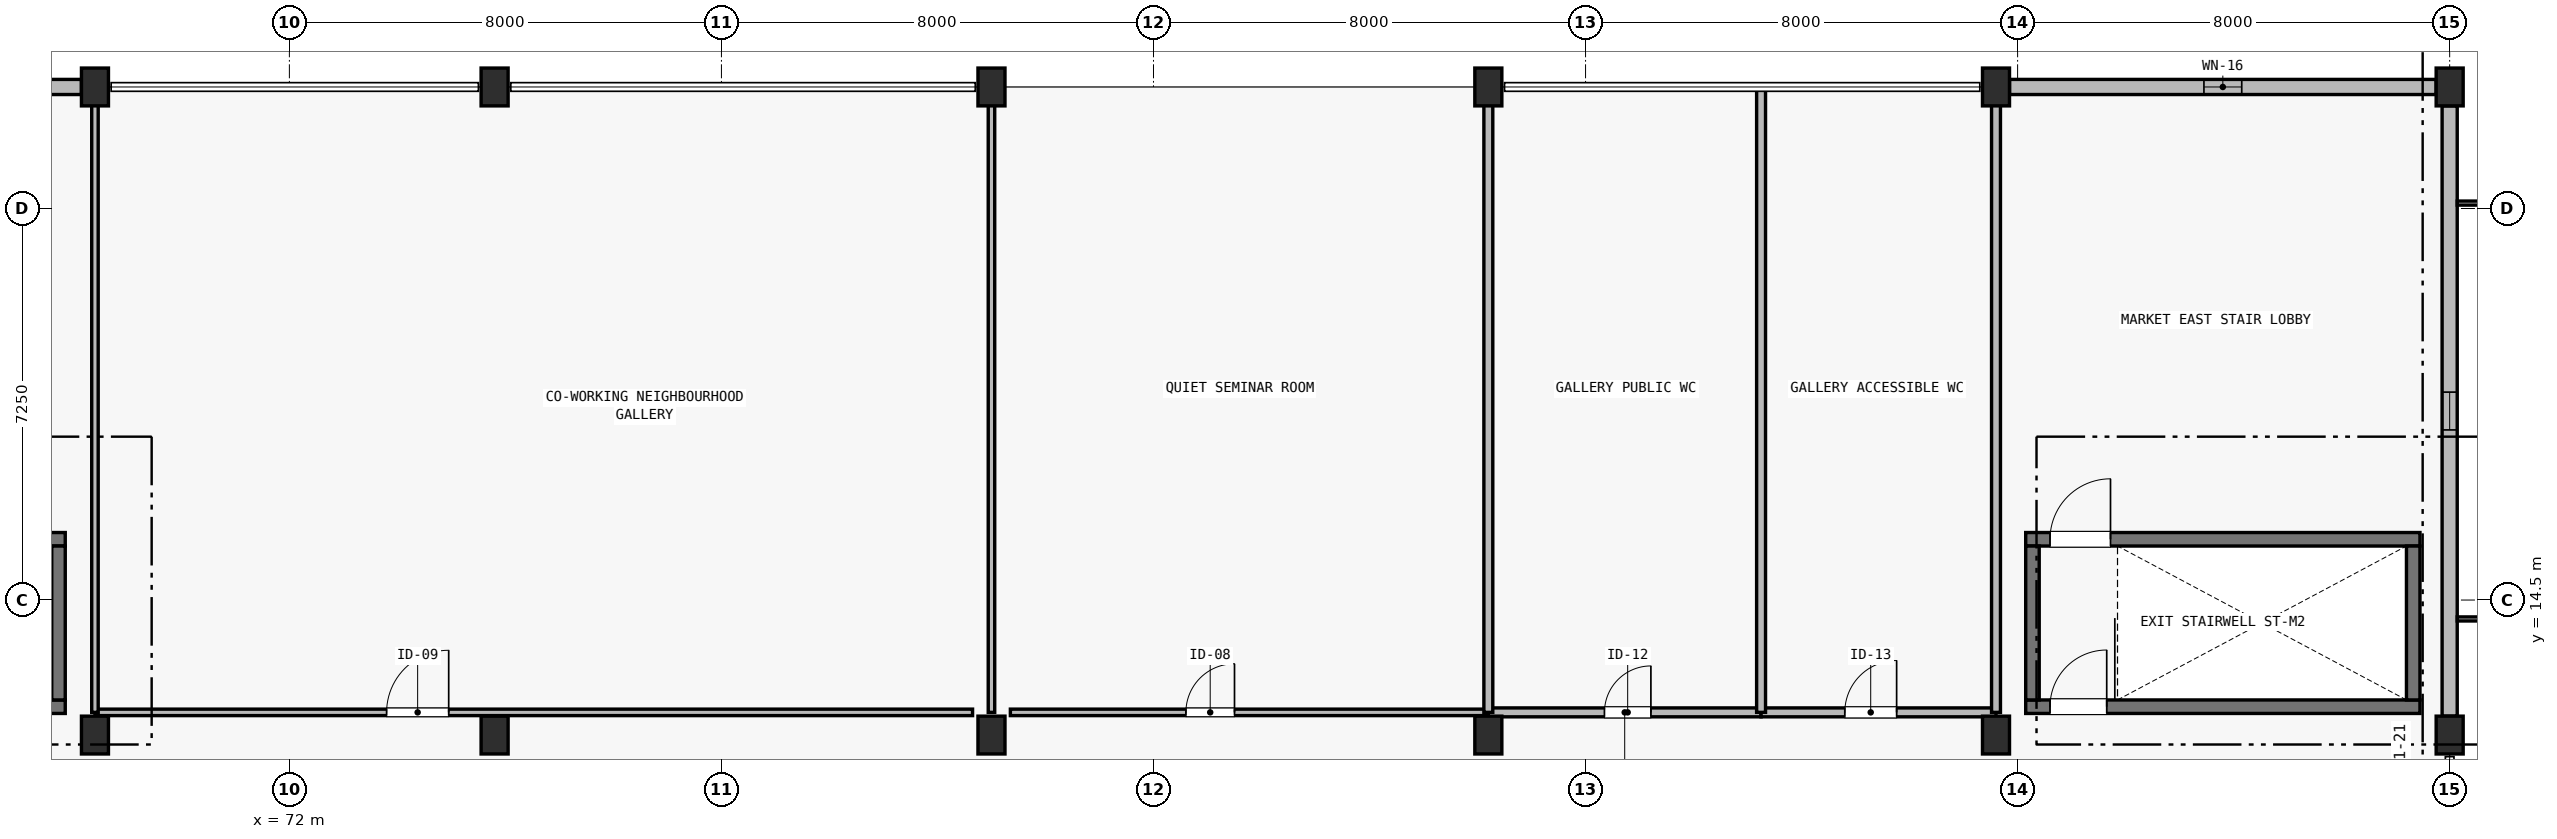
"""IFC4 building model, lengths in metres.
Left out: names, types, materials, properties, quantities, classifications, styles, units other than length and angle.
Written with IfcOpenShell. Run it as: python <this file> out.ifc"""

import sys

from ifc_helpers import new_model, si_unit, direction, frame, frame_2d, origin, origin_2d, place, context, subcontext, project, spatial, rectangle, extrude, element, fill, save


model = new_model("IFC4")
c1 = context("Model", 3, precision=1e-05, world=origin(), true_north=direction((0.0, 1.0)))
c2 = subcontext(c1, "Body", "Model", "MODEL_VIEW")
j1 = project(units=[si_unit("LENGTHUNIT", "METRE"), si_unit("PLANEANGLEUNIT", "RADIAN")], contexts=[c1])
p1 = place(None, origin())
s1 = spatial("IfcSite", under=j1, at=p1, CompositionType="ELEMENT")
p2 = place(p1, origin())
s2 = spatial("IfcBuilding", under=s1, at=p2, CompositionType="ELEMENT")
p3 = place(p2, frame((0.0, 0.0, 8.4)))
s3 = spatial("IfcBuildingStorey", under=s2, at=p3, CompositionType="ELEMENT", Elevation=8.4)
p4 = place(p3, frame((60.55, 12.525, 0.0), z_axis=(0.0, 0.0, 1.0), x_axis=(1.0, 0.0, 0.0)))
e1 = element("IfcWall", 1, at=p4, inside=s3, PredefinedType="SHEAR", context=c2, shape_type="SweptSolid", body=[
    extrude(rectangle(XDim=7.3, YDim=0.25, at=frame_2d((3.65, 0.0))), origin(), (0.0, 0.0, 1.0), 3.25),
])
p5 = place(p4, frame((0.45, 0.0, 0.0)))
e2 = element("IfcOpeningElement", 2, at=p5, cuts=e1, PredefinedType="OPENING", context=c2, shape_type="SweptSolid", body=[
    extrude(rectangle(XDim=1.05, YDim=2.15, at=frame_2d((0.525, 1.075))), frame((0.0, 0.14, 0.0), z_axis=(0.0, -1.0, 0.0), x_axis=(1.0, 0.0, 0.0)), (0.0, 0.0, 1.0), 0.28),
])
p6 = place(p3, frame((60.55, 15.625, 0.0), z_axis=(0.0, 0.0, 1.0), x_axis=(1.0, 0.0, 0.0)))
e3 = element("IfcWall", 3, at=p6, inside=s3, PredefinedType="SHEAR", context=c2, shape_type="SweptSolid", body=[
    extrude(rectangle(XDim=7.3, YDim=0.25, at=frame_2d((3.65, 0.0))), origin(), (0.0, 0.0, 1.0), 3.25),
])
p7 = place(p6, frame((0.45, 0.0, 0.0)))
e4 = element("IfcOpeningElement", 4, at=p7, cuts=e3, PredefinedType="OPENING", context=c2, shape_type="SweptSolid", body=[
    extrude(rectangle(XDim=1.12, YDim=2.15, at=frame_2d((0.56, 1.075))), frame((0.0, 0.14, 0.0), z_axis=(0.0, -1.0, 0.0), x_axis=(1.0, 0.0, 0.0)), (0.0, 0.0, 1.0), 0.28),
])
p8 = place(p3, frame((67.725, 12.65, 0.0), z_axis=(0.0, 0.0, 1.0), x_axis=(0.0, 1.0, 0.0)))
e5 = element("IfcWall", 5, at=p8, inside=s3, PredefinedType="SHEAR", context=c2, shape_type="SweptSolid", body=[
    extrude(rectangle(XDim=2.85, YDim=0.25, at=frame_2d((1.425, 0.0))), origin(), (0.0, 0.0, 1.0), 3.25),
])
p9 = place(p3, frame((104.15, 12.525, 0.0), z_axis=(0.0, 0.0, 1.0), x_axis=(1.0, 0.0, 0.0)))
e6 = element("IfcWall", 6, at=p9, inside=s3, PredefinedType="SHEAR", context=c2, shape_type="SweptSolid", body=[
    extrude(rectangle(XDim=7.3, YDim=0.25, at=frame_2d((3.65, 0.0))), origin(), (0.0, 0.0, 1.0), 3.25),
])
p10 = place(p9, frame((0.45, 0.0, 0.0)))
e7 = element("IfcOpeningElement", 7, at=p10, cuts=e6, PredefinedType="OPENING", context=c2, shape_type="SweptSolid", body=[
    extrude(rectangle(XDim=1.05, YDim=2.15, at=frame_2d((0.525, 1.075))), frame((0.0, 0.14, 0.0), z_axis=(0.0, -1.0, 0.0), x_axis=(1.0, 0.0, 0.0)), (0.0, 0.0, 1.0), 0.28),
])
p11 = place(p3, frame((104.15, 15.625, 0.0), z_axis=(0.0, 0.0, 1.0), x_axis=(1.0, 0.0, 0.0)))
e8 = element("IfcWall", 8, at=p11, inside=s3, PredefinedType="SHEAR", context=c2, shape_type="SweptSolid", body=[
    extrude(rectangle(XDim=7.3, YDim=0.25, at=frame_2d((3.65, 0.0))), origin(), (0.0, 0.0, 1.0), 3.25),
])
p12 = place(p11, frame((0.45, 0.0, 0.0)))
e9 = element("IfcOpeningElement", 9, at=p12, cuts=e8, PredefinedType="OPENING", context=c2, shape_type="SweptSolid", body=[
    extrude(rectangle(XDim=1.12, YDim=2.15, at=frame_2d((0.56, 1.075))), frame((0.0, 0.14, 0.0), z_axis=(0.0, -1.0, 0.0), x_axis=(1.0, 0.0, 0.0)), (0.0, 0.0, 1.0), 0.28),
])
for number, where, z_axis, x_axis in (
    (10, (104.275, 12.65, 0.0), (0.0, 0.0, 1.0), (0.0, 1.0, 0.0)),
    (11, (111.325, 12.65, 0.0), (0.0, 0.0, 1.0), (0.0, 1.0, 0.0)),
):
    element("IfcWall", number, at=place(p3, frame(where, z_axis=z_axis, x_axis=x_axis)), inside=s3, PredefinedType="SHEAR", context=c2, shape_type="SweptSolid", body=[
        extrude(rectangle(XDim=2.85, YDim=0.25, at=frame_2d((1.425, 0.0))), origin(), (0.0, 0.0, 1.0), 3.25),
    ])
p13 = place(p3, frame((68.4, 12.0, 0.0), z_axis=(0.0, 0.0, 1.0), x_axis=(1.0, 0.0, 0.0)))
e12 = element("IfcColumn", 12, at=p13, inside=s3, PredefinedType="COLUMN", context=c2, shape_type="SweptSolid", body=[
    extrude(rectangle(XDim=0.5, YDim=0.7, at=origin_2d()), origin(), (0.0, 0.0, 1.0), 4.095),
])
p14 = place(p3, frame((68.4, 24.0, 0.0), z_axis=(0.0, 0.0, 1.0), x_axis=(1.0, 0.0, 0.0)))
e13 = element("IfcColumn", 13, at=p14, inside=s3, PredefinedType="COLUMN", context=c2, shape_type="SweptSolid", body=[
    extrude(rectangle(XDim=0.5, YDim=0.7, at=origin_2d()), origin(), (0.0, 0.0, 1.0), 4.72),
])
p15 = place(p3, frame((75.8, 12.0, 0.0), z_axis=(0.0, 0.0, 1.0), x_axis=(1.0, 0.0, 0.0)))
e14 = element("IfcColumn", 14, at=p15, inside=s3, PredefinedType="COLUMN", context=c2, shape_type="SweptSolid", body=[
    extrude(rectangle(XDim=0.5, YDim=0.7, at=origin_2d()), origin(), (0.0, 0.0, 1.0), 4.095),
])
p16 = place(p3, frame((75.8, 24.0, 0.0), z_axis=(0.0, 0.0, 1.0), x_axis=(1.0, 0.0, 0.0)))
e15 = element("IfcColumn", 15, at=p16, inside=s3, PredefinedType="COLUMN", context=c2, shape_type="SweptSolid", body=[
    extrude(rectangle(XDim=0.5, YDim=0.7, at=origin_2d()), origin(), (0.0, 0.0, 1.0), 4.72),
])
p17 = place(p3, frame((85.0, 12.0, 0.0), z_axis=(0.0, 0.0, 1.0), x_axis=(1.0, 0.0, 0.0)))
e16 = element("IfcColumn", 16, at=p17, inside=s3, PredefinedType="COLUMN", context=c2, shape_type="SweptSolid", body=[
    extrude(rectangle(XDim=0.5, YDim=0.7, at=origin_2d()), origin(), (0.0, 0.0, 1.0), 4.095),
])
p18 = place(p3, frame((85.0, 24.0, 0.0), z_axis=(0.0, 0.0, 1.0), x_axis=(1.0, 0.0, 0.0)))
e17 = element("IfcColumn", 17, at=p18, inside=s3, PredefinedType="COLUMN", context=c2, shape_type="SweptSolid", body=[
    extrude(rectangle(XDim=0.5, YDim=0.7, at=origin_2d()), origin(), (0.0, 0.0, 1.0), 4.72),
])
p19 = place(p3, frame((94.2, 12.0, 0.0), z_axis=(0.0, 0.0, 1.0), x_axis=(1.0, 0.0, 0.0)))
e18 = element("IfcColumn", 18, at=p19, inside=s3, PredefinedType="COLUMN", context=c2, shape_type="SweptSolid", body=[
    extrude(rectangle(XDim=0.5, YDim=0.7, at=origin_2d()), origin(), (0.0, 0.0, 1.0), 4.095),
])
p20 = place(p3, frame((94.2, 24.0, 0.0), z_axis=(0.0, 0.0, 1.0), x_axis=(1.0, 0.0, 0.0)))
e19 = element("IfcColumn", 19, at=p20, inside=s3, PredefinedType="COLUMN", context=c2, shape_type="SweptSolid", body=[
    extrude(rectangle(XDim=0.5, YDim=0.7, at=origin_2d()), origin(), (0.0, 0.0, 1.0), 4.72),
])
p21 = place(p3, frame((103.6, 12.0, 0.0), z_axis=(0.0, 0.0, 1.0), x_axis=(1.0, 0.0, 0.0)))
e20 = element("IfcColumn", 20, at=p21, inside=s3, PredefinedType="COLUMN", context=c2, shape_type="SweptSolid", body=[
    extrude(rectangle(XDim=0.5, YDim=0.7, at=origin_2d()), origin(), (0.0, 0.0, 1.0), 4.095),
])
p22 = place(p3, frame((103.6, 24.0, 0.0), z_axis=(0.0, 0.0, 1.0), x_axis=(1.0, 0.0, 0.0)))
e21 = element("IfcColumn", 21, at=p22, inside=s3, PredefinedType="COLUMN", context=c2, shape_type="SweptSolid", body=[
    extrude(rectangle(XDim=0.5, YDim=0.7, at=origin_2d()), origin(), (0.0, 0.0, 1.0), 4.72),
])
p23 = place(p3, frame((112.0, 12.0, 0.0), z_axis=(0.0, 0.0, 1.0), x_axis=(1.0, 0.0, 0.0)))
e22 = element("IfcColumn", 22, at=p23, inside=s3, PredefinedType="COLUMN", context=c2, shape_type="SweptSolid", body=[
    extrude(rectangle(XDim=0.5, YDim=0.7, at=origin_2d()), origin(), (0.0, 0.0, 1.0), 4.095),
])
p24 = place(p3, frame((112.0, 24.0, 0.0), z_axis=(0.0, 0.0, 1.0), x_axis=(1.0, 0.0, 0.0)))
e23 = element("IfcColumn", 23, at=p24, inside=s3, PredefinedType="COLUMN", context=c2, shape_type="SweptSolid", body=[
    extrude(rectangle(XDim=0.5, YDim=0.7, at=origin_2d()), origin(), (0.0, 0.0, 1.0), 4.72),
])
p25 = place(p3, frame((60.25, 24.0, 0.0), z_axis=(0.0, 0.0, 1.0), x_axis=(1.0, 0.0, 0.0)))
e24 = element("IfcWall", 24, at=p25, inside=s3, PredefinedType="SOLIDWALL", context=c2, shape_type="SweptSolid", body=[
    extrude(rectangle(XDim=7.9, YDim=0.28, at=frame_2d((3.95, 0.0))), origin(), (0.0, 0.0, 1.0), 2.34),
])
p26 = place(p25, frame((3.6, 0.0, 0.16)))
e25 = element("IfcOpeningElement", 25, at=p26, cuts=e24, PredefinedType="OPENING", context=c2, shape_type="SweptSolid", body=[
    extrude(rectangle(XDim=0.7, YDim=2.14, at=frame_2d((0.35, 1.07))), frame((0.0, 0.155, 0.0), z_axis=(0.0, -1.0, 0.0), x_axis=(1.0, 0.0, 0.0)), (0.0, 0.0, 1.0), 0.31),
])
p27 = place(p3, frame((103.85, 24.0, 0.0), z_axis=(0.0, 0.0, 1.0), x_axis=(1.0, 0.0, 0.0)))
e26 = element("IfcWall", 26, at=p27, inside=s3, PredefinedType="SOLIDWALL", context=c2, shape_type="SweptSolid", body=[
    extrude(rectangle(XDim=7.9, YDim=0.28, at=frame_2d((3.95, 0.0))), origin(), (0.0, 0.0, 1.0), 2.34),
])
p28 = place(p27, frame((3.6, 0.0, 0.16)))
e27 = element("IfcOpeningElement", 27, at=p28, cuts=e26, PredefinedType="OPENING", context=c2, shape_type="SweptSolid", body=[
    extrude(rectangle(XDim=0.7, YDim=2.14, at=frame_2d((0.35, 1.07))), frame((0.0, 0.155, 0.0), z_axis=(0.0, -1.0, 0.0), x_axis=(1.0, 0.0, 0.0)), (0.0, 0.0, 1.0), 0.31),
])
p29 = place(p3, frame((112.0, 23.65, 0.0), z_axis=(0.0, 0.0, 1.0), x_axis=(0.0, -1.0, 0.0)))
e28 = element("IfcWall", 28, at=p29, inside=s3, PredefinedType="SOLIDWALL", context=c2, shape_type="SweptSolid", body=[
    extrude(rectangle(XDim=11.3, YDim=0.28, at=frame_2d((5.65, 0.0))), origin(), (0.0, 0.0, 1.0), 2.34),
])
p30 = place(p29, frame((5.3, 0.0, 0.16)))
e29 = element("IfcOpeningElement", 29, at=p30, cuts=e28, PredefinedType="OPENING", context=c2, shape_type="SweptSolid", body=[
    extrude(rectangle(XDim=0.7, YDim=2.14, at=frame_2d((0.35, 1.07))), frame((0.0, 0.155, 0.0), z_axis=(0.0, -1.0, 0.0), x_axis=(1.0, 0.0, 0.0)), (0.0, 0.0, 1.0), 0.31),
])
p31 = place(p3, frame((68.4, 12.42, 0.0), z_axis=(0.0, 0.0, 1.0), x_axis=(1.0, 0.0, 0.0)))
e30 = element("IfcWall", 30, at=p31, inside=s3, PredefinedType="PARTITIONING", context=c2, shape_type="SweptSolid", body=[
    extrude(rectangle(XDim=16.25, YDim=0.12, at=frame_2d((8.125, 0.0))), origin(), (0.0, 0.0, 1.0), 2.98),
])
p32 = place(p31, frame((5.4, 0.0, 0.0)))
e31 = element("IfcOpeningElement", 31, at=p32, cuts=e30, PredefinedType="OPENING", context=c2, shape_type="SweptSolid", body=[
    extrude(rectangle(XDim=1.15, YDim=2.15, at=frame_2d((0.575, 1.075))), frame((0.0, 0.075, 0.0), z_axis=(0.0, -1.0, 0.0), x_axis=(1.0, 0.0, 0.0)), (0.0, 0.0, 1.0), 0.15),
])
p33 = place(p3, frame((85.35, 12.42, 0.0), z_axis=(0.0, 0.0, 1.0), x_axis=(1.0, 0.0, 0.0)))
e32 = element("IfcWall", 32, at=p33, inside=s3, PredefinedType="PARTITIONING", context=c2, shape_type="SweptSolid", body=[
    extrude(rectangle(XDim=8.85, YDim=0.12, at=frame_2d((4.425, 0.0))), origin(), (0.0, 0.0, 1.0), 2.98),
])
p34 = place(p33, frame((3.25, 0.0, 0.0)))
e33 = element("IfcOpeningElement", 33, at=p34, cuts=e32, PredefinedType="OPENING", context=c2, shape_type="SweptSolid", body=[
    extrude(rectangle(XDim=0.9, YDim=2.1, at=frame_2d((0.45, 1.05))), frame((0.0, 0.075, 0.0), z_axis=(0.0, -1.0, 0.0), x_axis=(1.0, 0.0, 0.0)), (0.0, 0.0, 1.0), 0.15),
])
p35 = place(p3, frame((94.2, 12.42, 0.0), z_axis=(0.0, 0.0, 1.0), x_axis=(1.0, 0.0, 0.0)))
e34 = element("IfcWall", 34, at=p35, inside=s3, PredefinedType="PLUMBINGWALL", context=c2, shape_type="SweptSolid", body=[
    extrude(rectangle(XDim=5.05, YDim=0.165, at=frame_2d((2.525, 0.0))), origin(), (0.0, 0.0, 1.0), 2.98),
])
p36 = place(p35, frame((2.15, 0.0, 0.0)))
e35 = element("IfcOpeningElement", 35, at=p36, cuts=e34, PredefinedType="OPENING", context=c2, shape_type="SweptSolid", body=[
    extrude(rectangle(XDim=0.86, YDim=2.1, at=frame_2d((0.43, 1.05))), frame((0.0, 0.097, 0.0), z_axis=(0.0, -1.0, 0.0), x_axis=(1.0, 0.0, 0.0)), (0.0, 0.0, 1.0), 0.195),
])
p37 = place(p3, frame((99.25, 12.42, 0.0), z_axis=(0.0, 0.0, 1.0), x_axis=(1.0, 0.0, 0.0)))
e36 = element("IfcWall", 36, at=p37, inside=s3, PredefinedType="PLUMBINGWALL", context=c2, shape_type="SweptSolid", body=[
    extrude(rectangle(XDim=4.35, YDim=0.165, at=frame_2d((2.175, 0.0))), origin(), (0.0, 0.0, 1.0), 2.98),
])
p38 = place(p37, frame((1.55, 0.0, 0.0)))
e37 = element("IfcOpeningElement", 37, at=p38, cuts=e36, PredefinedType="OPENING", context=c2, shape_type="SweptSolid", body=[
    extrude(rectangle(XDim=0.96, YDim=2.12, at=frame_2d((0.48, 1.06))), frame((0.0, 0.097, 0.0), z_axis=(0.0, -1.0, 0.0), x_axis=(1.0, 0.0, 0.0)), (0.0, 0.0, 1.0), 0.195),
])
for number, where, z_axis, x_axis in (
    (38, (68.4, 12.42, 0.0), (0.0, 0.0, 1.0), (0.0, 1.0, 0.0)),
    (39, (85.0, 12.42, 0.0), (0.0, 0.0, 1.0), (0.0, 1.0, 0.0)),
):
    element("IfcWall", number, at=place(p3, frame(where, z_axis=z_axis, x_axis=x_axis)), inside=s3, PredefinedType="PARTITIONING", context=c2, shape_type="SweptSolid", body=[
        extrude(rectangle(XDim=11.54, YDim=0.12, at=frame_2d((5.77, 0.0))), origin(), (0.0, 0.0, 1.0), 2.35),
    ])
p39 = place(p3, frame((94.2, 12.42, 0.0), z_axis=(0.0, 0.0, 1.0), x_axis=(0.0, 1.0, 0.0)))
e40 = element("IfcWall", 40, at=p39, inside=s3, PredefinedType="PLUMBINGWALL", context=c2, shape_type="SweptSolid", body=[
    extrude(rectangle(XDim=11.54, YDim=0.165, at=frame_2d((5.77, 0.0))), origin(), (0.0, 0.0, 1.0), 2.35),
])
p40 = place(p3, frame((99.25, 12.42, 0.0), z_axis=(0.0, 0.0, 1.0), x_axis=(0.0, 1.0, 0.0)))
e41 = element("IfcWall", 41, at=p40, inside=s3, PredefinedType="PLUMBINGWALL", context=c2, shape_type="SweptSolid", body=[
    extrude(rectangle(XDim=11.54, YDim=0.165, at=frame_2d((5.77, 0.0))), origin(), (0.0, 0.0, 1.0), 2.98),
])
p41 = place(p3, frame((103.6, 12.42, 0.0), z_axis=(0.0, 0.0, 1.0), x_axis=(0.0, 1.0, 0.0)))
e42 = element("IfcWall", 42, at=p41, inside=s3, PredefinedType="PLUMBINGWALL", context=c2, shape_type="SweptSolid", body=[
    extrude(rectangle(XDim=11.54, YDim=0.165, at=frame_2d((5.77, 0.0))), origin(), (0.0, 0.0, 1.0), 2.35),
])
p42 = place(p28, origin())
e43 = element("IfcWindow", 43, at=p42, inside=s3, PartitioningType="SINGLE_PANEL", PredefinedType="WINDOW", context=c2, shape_type="SweptSolid", body=[
    extrude(rectangle(XDim=0.7, YDim=2.14, at=frame_2d((0.35, 1.07))), frame((0.0, 0.03, 0.0), z_axis=(0.0, -1.0, 0.0), x_axis=(1.0, 0.0, 0.0)), (0.0, 0.0, 1.0), 0.06),
])
fill(e27, e43)
p43 = place(p30, origin())
e44 = element("IfcWindow", 44, at=p43, inside=s3, PartitioningType="SINGLE_PANEL", PredefinedType="WINDOW", context=c2, shape_type="SweptSolid", body=[
    extrude(rectangle(XDim=0.7, YDim=2.14, at=frame_2d((0.35, 1.07))), frame((0.0, 0.03, 0.0), z_axis=(0.0, -1.0, 0.0), x_axis=(1.0, 0.0, 0.0)), (0.0, 0.0, 1.0), 0.06),
])
fill(e29, e44)
p44 = place(p32, origin())
e45 = element("IfcDoor", 45, at=p44, inside=s3, OperationType="SINGLE_SWING_RIGHT", PredefinedType="DOOR", context=c2, shape_type="SweptSolid", body=[
    extrude(rectangle(XDim=1.15, YDim=2.15, at=frame_2d((0.575, 1.075))), frame((0.0, 0.025, 0.0), z_axis=(0.0, -1.0, 0.0), x_axis=(1.0, 0.0, 0.0)), (0.0, 0.0, 1.0), 0.05),
])
fill(e31, e45)
p45 = place(p34, origin())
e46 = element("IfcDoor", 46, at=p45, inside=s3, OperationType="SINGLE_SWING_RIGHT", PredefinedType="DOOR", context=c2, shape_type="SweptSolid", body=[
    extrude(rectangle(XDim=0.9, YDim=2.1, at=frame_2d((0.45, 1.05))), frame((0.0, 0.025, 0.0), z_axis=(0.0, -1.0, 0.0), x_axis=(1.0, 0.0, 0.0)), (0.0, 0.0, 1.0), 0.05),
])
fill(e33, e46)
p46 = place(p36, origin())
e47 = element("IfcDoor", 47, at=p46, inside=s3, OperationType="SINGLE_SWING_RIGHT", PredefinedType="DOOR", context=c2, shape_type="SweptSolid", body=[
    extrude(rectangle(XDim=0.86, YDim=2.1, at=frame_2d((0.43, 1.05))), frame((0.0, 0.025, 0.0), z_axis=(0.0, -1.0, 0.0), x_axis=(1.0, 0.0, 0.0)), (0.0, 0.0, 1.0), 0.05),
])
fill(e35, e47)
p47 = place(p38, origin())
e48 = element("IfcDoor", 48, at=p47, inside=s3, OperationType="SINGLE_SWING_RIGHT", PredefinedType="DOOR", context=c2, shape_type="SweptSolid", body=[
    extrude(rectangle(XDim=0.96, YDim=2.12, at=frame_2d((0.48, 1.06))), frame((0.0, 0.025, 0.0), z_axis=(0.0, -1.0, 0.0), x_axis=(1.0, 0.0, 0.0)), (0.0, 0.0, 1.0), 0.05),
])
fill(e37, e48)
p48 = place(p10, origin())
e49 = element("IfcDoor", 49, at=p48, inside=s3, OperationType="SINGLE_SWING_RIGHT", PredefinedType="DOOR", context=c2, shape_type="SweptSolid", body=[
    extrude(rectangle(XDim=1.05, YDim=2.15, at=frame_2d((0.525, 1.075))), frame((0.0, 0.025, 0.0), z_axis=(0.0, -1.0, 0.0), x_axis=(1.0, 0.0, 0.0)), (0.0, 0.0, 1.0), 0.05),
])
fill(e7, e49)
p49 = place(p12, origin())
e50 = element("IfcDoor", 50, at=p49, inside=s3, OperationType="SINGLE_SWING_RIGHT", PredefinedType="DOOR", context=c2, shape_type="SweptSolid", body=[
    extrude(rectangle(XDim=1.12, YDim=2.15, at=frame_2d((0.56, 1.075))), frame((0.0, 0.025, 0.0), z_axis=(0.0, -1.0, 0.0), x_axis=(1.0, 0.0, 0.0)), (0.0, 0.0, 1.0), 0.05),
])
fill(e9, e50)
save(model, sys.argv[1])
